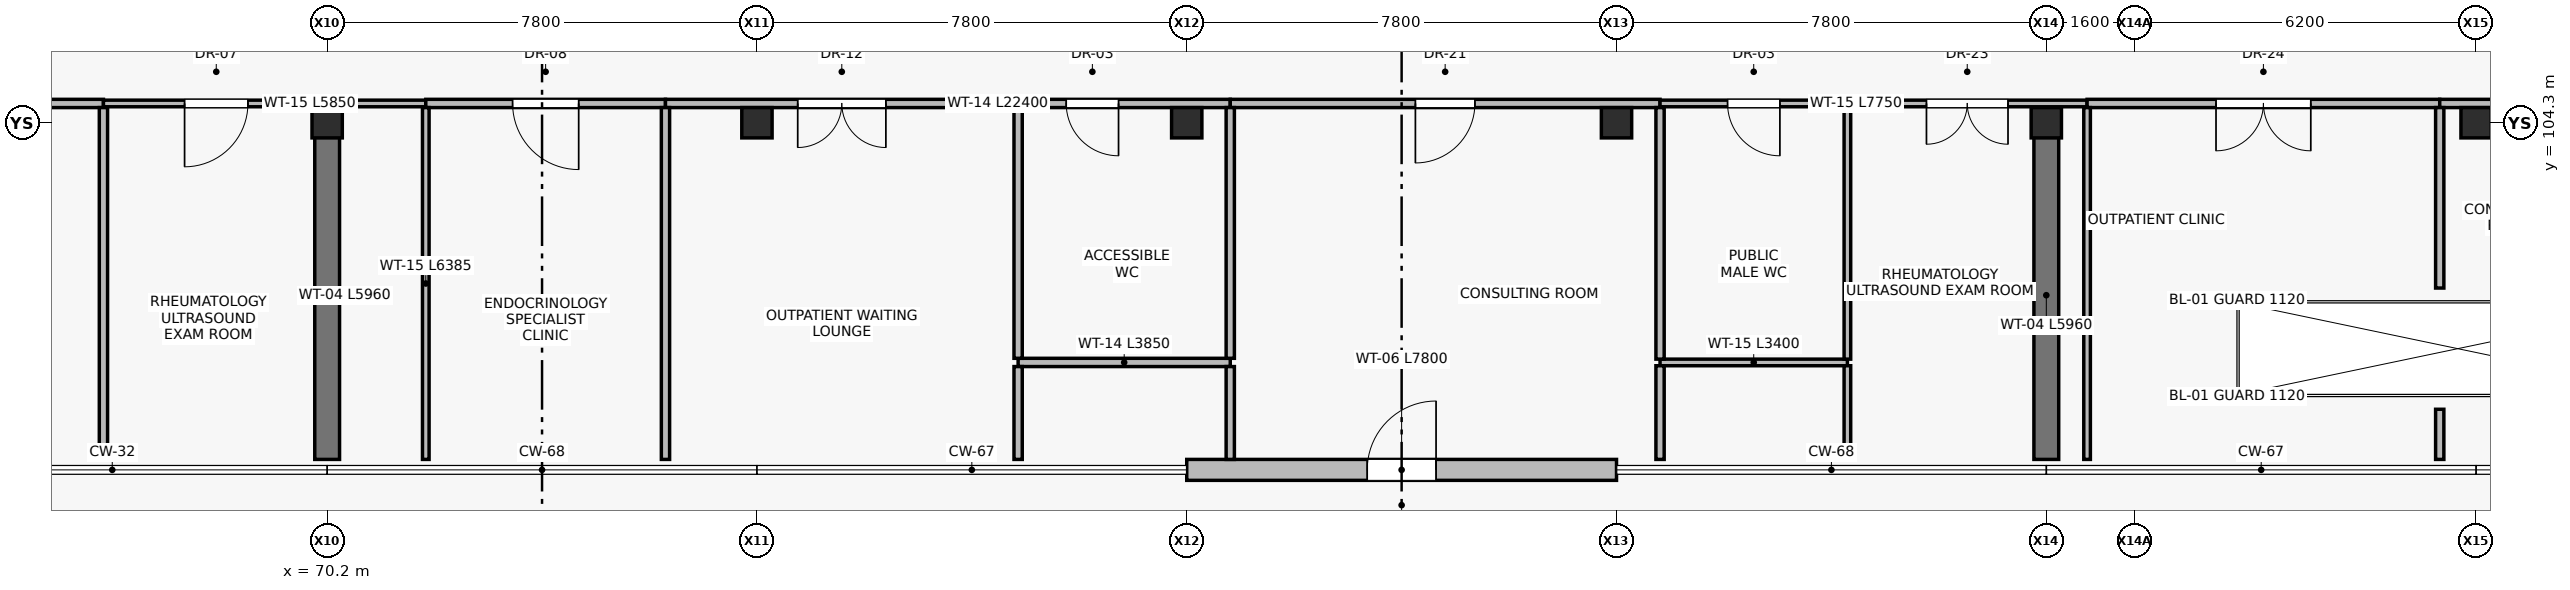
"""IFC4 building model, lengths in metres.
Left out: names, types, materials, properties, quantities, classifications, styles, units other than length and angle.
Written with IfcOpenShell. Run it as: python <this file> out.ifc"""

import sys

from ifc_helpers import new_model, si_unit, direction, frame, frame_2d, origin, origin_2d, place, context, subcontext, project, spatial, rectangle, extrude, element, fill, save


model = new_model("IFC4")
c1 = context("Model", 3, precision=1e-05, world=origin(), true_north=direction((0.0, 1.0)))
c2 = subcontext(c1, "Body", "Model", "MODEL_VIEW")
j1 = project(units=[si_unit("LENGTHUNIT", "METRE"), si_unit("PLANEANGLEUNIT", "RADIAN")], contexts=[c1])
p1 = place(None, origin())
s1 = spatial("IfcSite", under=j1, at=p1, CompositionType="ELEMENT")
p2 = place(p1, origin())
s2 = spatial("IfcBuilding", under=s1, at=p2, CompositionType="ELEMENT")
p3 = place(p2, frame((0.0, 0.0, 9.6)))
s3 = spatial("IfcBuildingStorey", under=s2, at=p3, CompositionType="ELEMENT", Elevation=9.6)
for number, where, z_axis, x_axis in (
    (1, (70.2, 104.3, 0.0), (0.0, 0.0, 1.0), (1.0, 0.0, 0.0)),
    (2, (78.0, 104.3, 0.0), (0.0, 0.0, 1.0), (1.0, 0.0, 0.0)),
    (3, (85.8, 104.3, 0.0), (0.0, 0.0, 1.0), (1.0, 0.0, 0.0)),
    (4, (93.6, 104.3, 0.0), (0.0, 0.0, 1.0), (1.0, 0.0, 0.0)),
    (5, (101.4, 104.3, 0.0), (0.0, 0.0, 1.0), (1.0, 0.0, 0.0)),
    (6, (109.2, 104.3, 0.0), (0.0, 0.0, 1.0), (1.0, 0.0, 0.0)),
):
    element("IfcColumn", number, at=place(p3, frame(where, z_axis=z_axis, x_axis=x_axis)), inside=s3, PredefinedType="COLUMN", context=c2, shape_type="SweptSolid", body=[
        extrude(rectangle(XDim=0.55, YDim=0.55, at=origin_2d()), origin(), (0.0, 0.0, 1.0), 4.5),
    ])
p4 = place(p3, frame((93.6, 98.0, 0.0), z_axis=(0.0, 0.0, 1.0), x_axis=(-1.0, 0.0, 0.0)))
e7 = element("IfcWall", 7, at=p4, inside=s3, PredefinedType="STANDARD", context=c2, shape_type="SweptSolid", body=[
    extrude(rectangle(XDim=7.8, YDim=0.38, at=frame_2d((3.9, 0.0))), origin(), (0.0, 0.0, 1.0), 4.24),
])
p5 = place(p4, frame((3.275, 0.0, 0.0)))
e8 = element("IfcOpeningElement", 8, at=p5, cuts=e7, PredefinedType="OPENING", context=c2, shape_type="SweptSolid", body=[
    extrude(rectangle(XDim=1.25, YDim=2.2, at=frame_2d((0.625, 1.1))), frame((0.0, 0.2, 0.0), z_axis=(0.0, -1.0, 0.0), x_axis=(1.0, 0.0, 0.0)), (0.0, 0.0, 1.0), 0.4),
])
for number, where, z_axis, x_axis in (
    (9, (70.2, 98.19, 0.0), (0.0, 0.0, 1.0), (0.0, 1.0, 0.0)),
    (10, (101.4, 98.19, 0.0), (0.0, 0.0, 1.0), (0.0, 1.0, 0.0)),
):
    element("IfcWall", number, at=place(p3, frame(where, z_axis=z_axis, x_axis=x_axis)), inside=s3, PredefinedType="SHEAR", context=c2, shape_type="SweptSolid", body=[
        extrude(rectangle(XDim=5.96, YDim=0.45, at=frame_2d((2.98, 0.0))), origin(), (0.0, 0.0, 1.0), 4.24),
    ])
p6 = place(p3, frame((66.14, 104.65, 0.0), z_axis=(0.0, 0.0, 1.0), x_axis=(-1.0, 0.0, 0.0)))
e11 = element("IfcWall", 11, at=p6, inside=s3, PredefinedType="PARTITIONING", context=c2, shape_type="SweptSolid", body=[
    extrude(rectangle(XDim=7.8, YDim=0.15, at=frame_2d((3.9, 0.0))), origin(), (0.0, 0.0, 1.0), 3.74),
])
p7 = place(p6, frame((4.52, 0.0, 0.0)))
e12 = element("IfcOpeningElement", 12, at=p7, cuts=e11, PredefinedType="OPENING", context=c2, shape_type="SweptSolid", body=[
    extrude(rectangle(XDim=1.1, YDim=2.15, at=frame_2d((0.55, 1.075))), frame((0.0, 0.085, 0.0), z_axis=(0.0, -1.0, 0.0), x_axis=(1.0, 0.0, 0.0)), (0.0, 0.0, 1.0), 0.17),
])
p8 = place(p3, frame((71.99, 104.65, 0.0), z_axis=(0.0, 0.0, 1.0), x_axis=(-1.0, 0.0, 0.0)))
e13 = element("IfcWall", 13, at=p8, inside=s3, PredefinedType="PARTITIONING", context=c2, shape_type="SweptSolid", body=[
    extrude(rectangle(XDim=5.85, YDim=0.12, at=frame_2d((2.925, 0.0))), origin(), (0.0, 0.0, 1.0), 3.74),
])
p9 = place(p8, frame((3.228, 0.0, 0.0)))
e14 = element("IfcOpeningElement", 14, at=p9, cuts=e13, PredefinedType="OPENING", context=c2, shape_type="SweptSolid", body=[
    extrude(rectangle(XDim=1.15, YDim=2.2, at=frame_2d((0.575, 1.1))), frame((0.0, 0.07, 0.0), z_axis=(0.0, -1.0, 0.0), x_axis=(1.0, 0.0, 0.0)), (0.0, 0.0, 1.0), 0.14),
])
p10 = place(p3, frame((76.34, 104.65, 0.0), z_axis=(0.0, 0.0, 1.0), x_axis=(-1.0, 0.0, 0.0)))
e15 = element("IfcWall", 15, at=p10, inside=s3, PredefinedType="PARTITIONING", context=c2, shape_type="SweptSolid", body=[
    extrude(rectangle(XDim=4.35, YDim=0.15, at=frame_2d((2.175, 0.0))), origin(), (0.0, 0.0, 1.0), 3.74),
])
p11 = place(p10, frame((1.575, 0.0, 0.0)))
e16 = element("IfcOpeningElement", 16, at=p11, cuts=e15, PredefinedType="OPENING", context=c2, shape_type="SweptSolid", body=[
    extrude(rectangle(XDim=1.2, YDim=2.2, at=frame_2d((0.6, 1.1))), frame((0.0, 0.085, 0.0), z_axis=(0.0, -1.0, 0.0), x_axis=(1.0, 0.0, 0.0)), (0.0, 0.0, 1.0), 0.17),
])
p12 = place(p3, frame((82.74, 104.65, 0.0), z_axis=(0.0, 0.0, 1.0), x_axis=(-1.0, 0.0, 0.0)))
e17 = element("IfcWall", 17, at=p12, inside=s3, PredefinedType="PARTITIONING", context=c2, shape_type="SweptSolid", body=[
    extrude(rectangle(XDim=6.4, YDim=0.15, at=frame_2d((3.2, 0.0))), origin(), (0.0, 0.0, 1.0), 3.74),
])
p13 = place(p12, frame((2.4, 0.0, 0.0)))
e18 = element("IfcOpeningElement", 18, at=p13, cuts=e17, PredefinedType="OPENING", context=c2, shape_type="SweptSolid", body=[
    extrude(rectangle(XDim=1.6, YDim=2.2, at=frame_2d((0.8, 1.1))), frame((0.0, 0.085, 0.0), z_axis=(0.0, -1.0, 0.0), x_axis=(1.0, 0.0, 0.0)), (0.0, 0.0, 1.0), 0.17),
])
p14 = place(p3, frame((86.59, 104.65, 0.0), z_axis=(0.0, 0.0, 1.0), x_axis=(-1.0, 0.0, 0.0)))
e19 = element("IfcWall", 19, at=p14, inside=s3, PredefinedType="PARTITIONING", context=c2, shape_type="SweptSolid", body=[
    extrude(rectangle(XDim=3.85, YDim=0.15, at=frame_2d((1.925, 0.0))), origin(), (0.0, 0.0, 1.0), 3.74),
])
p15 = place(p14, frame((2.028, 0.0, 0.0)))
e20 = element("IfcOpeningElement", 20, at=p15, cuts=e19, PredefinedType="OPENING", context=c2, shape_type="SweptSolid", body=[
    extrude(rectangle(XDim=0.95, YDim=2.1, at=frame_2d((0.475, 1.05))), frame((0.0, 0.085, 0.0), z_axis=(0.0, -1.0, 0.0), x_axis=(1.0, 0.0, 0.0)), (0.0, 0.0, 1.0), 0.17),
])
p16 = place(p3, frame((82.74, 99.95, 0.0), z_axis=(0.0, 0.0, 1.0), x_axis=(1.0, 0.0, 0.0)))
e21 = element("IfcWall", 21, at=p16, inside=s3, PredefinedType="PARTITIONING", context=c2, shape_type="SweptSolid", body=[
    extrude(rectangle(XDim=3.85, YDim=0.15, at=frame_2d((1.925, 0.0))), origin(), (0.0, 0.0, 1.0), 4.24),
])
p17 = place(p3, frame((94.39, 104.65, 0.0), z_axis=(0.0, 0.0, 1.0), x_axis=(-1.0, 0.0, 0.0)))
e22 = element("IfcWall", 22, at=p17, inside=s3, PredefinedType="PARTITIONING", context=c2, shape_type="SweptSolid", body=[
    extrude(rectangle(XDim=7.8, YDim=0.15, at=frame_2d((3.9, 0.0))), origin(), (0.0, 0.0, 1.0), 3.74),
])
p18 = place(p17, frame((3.36, 0.0, 0.0)))
e23 = element("IfcOpeningElement", 23, at=p18, cuts=e22, PredefinedType="OPENING", context=c2, shape_type="SweptSolid", body=[
    extrude(rectangle(XDim=1.08, YDim=2.2, at=frame_2d((0.54, 1.1))), frame((0.0, 0.085, 0.0), z_axis=(0.0, -1.0, 0.0), x_axis=(1.0, 0.0, 0.0)), (0.0, 0.0, 1.0), 0.17),
])
p19 = place(p3, frame((97.79, 104.65, 0.0), z_axis=(0.0, 0.0, 1.0), x_axis=(-1.0, 0.0, 0.0)))
e24 = element("IfcWall", 24, at=p19, inside=s3, PredefinedType="PARTITIONING", context=c2, shape_type="SweptSolid", body=[
    extrude(rectangle(XDim=3.4, YDim=0.12, at=frame_2d((1.7, 0.0))), origin(), (0.0, 0.0, 1.0), 3.74),
])
p20 = place(p19, frame((1.225, 0.0, 0.0)))
e25 = element("IfcOpeningElement", 25, at=p20, cuts=e24, PredefinedType="OPENING", context=c2, shape_type="SweptSolid", body=[
    extrude(rectangle(XDim=0.95, YDim=2.1, at=frame_2d((0.475, 1.05))), frame((0.0, 0.07, 0.0), z_axis=(0.0, -1.0, 0.0), x_axis=(1.0, 0.0, 0.0)), (0.0, 0.0, 1.0), 0.14),
])
p21 = place(p3, frame((94.39, 99.95, 0.0), z_axis=(0.0, 0.0, 1.0), x_axis=(1.0, 0.0, 0.0)))
e26 = element("IfcWall", 26, at=p21, inside=s3, PredefinedType="PARTITIONING", context=c2, shape_type="SweptSolid", body=[
    extrude(rectangle(XDim=3.4, YDim=0.12, at=frame_2d((1.7, 0.0))), origin(), (0.0, 0.0, 1.0), 4.24),
])
p22 = place(p3, frame((102.14, 104.65, 0.0), z_axis=(0.0, 0.0, 1.0), x_axis=(-1.0, 0.0, 0.0)))
e27 = element("IfcWall", 27, at=p22, inside=s3, PredefinedType="PARTITIONING", context=c2, shape_type="SweptSolid", body=[
    extrude(rectangle(XDim=4.35, YDim=0.12, at=frame_2d((2.175, 0.0))), origin(), (0.0, 0.0, 1.0), 3.74),
])
p23 = place(p22, frame((1.435, 0.0, 0.0)))
e28 = element("IfcOpeningElement", 28, at=p23, cuts=e27, PredefinedType="OPENING", context=c2, shape_type="SweptSolid", body=[
    extrude(rectangle(XDim=1.48, YDim=2.25, at=frame_2d((0.74, 1.125))), frame((0.0, 0.07, 0.0), z_axis=(0.0, -1.0, 0.0), x_axis=(1.0, 0.0, 0.0)), (0.0, 0.0, 1.0), 0.14),
])
p24 = place(p3, frame((108.54, 104.65, 0.0), z_axis=(0.0, 0.0, 1.0), x_axis=(-1.0, 0.0, 0.0)))
e29 = element("IfcWall", 29, at=p24, inside=s3, PredefinedType="PARTITIONING", context=c2, shape_type="SweptSolid", body=[
    extrude(rectangle(XDim=6.4, YDim=0.15, at=frame_2d((3.2, 0.0))), origin(), (0.0, 0.0, 1.0), 3.74),
])
p25 = place(p24, frame((2.34, 0.0, 0.0)))
e30 = element("IfcOpeningElement", 30, at=p25, cuts=e29, PredefinedType="OPENING", context=c2, shape_type="SweptSolid", body=[
    extrude(rectangle(XDim=1.72, YDim=2.3, at=frame_2d((0.86, 1.15))), frame((0.0, 0.085, 0.0), z_axis=(0.0, -1.0, 0.0), x_axis=(1.0, 0.0, 0.0)), (0.0, 0.0, 1.0), 0.17),
])
p26 = place(p3, frame((113.49, 104.65, 0.0), z_axis=(0.0, 0.0, 1.0), x_axis=(-1.0, 0.0, 0.0)))
e31 = element("IfcWall", 31, at=p26, inside=s3, PredefinedType="PARTITIONING", context=c2, shape_type="SweptSolid", body=[
    extrude(rectangle(XDim=4.95, YDim=0.15, at=frame_2d((2.475, 0.0))), origin(), (0.0, 0.0, 1.0), 3.74),
])
p27 = place(p26, frame((2.025, 0.0, 0.0)))
e32 = element("IfcOpeningElement", 32, at=p27, cuts=e31, PredefinedType="OPENING", context=c2, shape_type="SweptSolid", body=[
    extrude(rectangle(XDim=0.9, YDim=2.1, at=frame_2d((0.45, 1.05))), frame((0.0, 0.085, 0.0), z_axis=(0.0, -1.0, 0.0), x_axis=(1.0, 0.0, 0.0)), (0.0, 0.0, 1.0), 0.17),
])
p28 = place(p3, frame((66.14, 98.19, 0.0), z_axis=(0.0, 0.0, 1.0), x_axis=(0.0, 1.0, 0.0)))
e33 = element("IfcWall", 33, at=p28, inside=s3, PredefinedType="PARTITIONING", context=c2, shape_type="SweptSolid", body=[
    extrude(rectangle(XDim=6.385, YDim=0.15, at=frame_2d((3.192, 0.0))), origin(), (0.0, 0.0, 1.0), 4.24),
])
p29 = place(p3, frame((71.99, 98.19, 0.0), z_axis=(0.0, 0.0, 1.0), x_axis=(0.0, 1.0, 0.0)))
e34 = element("IfcWall", 34, at=p29, inside=s3, PredefinedType="PARTITIONING", context=c2, shape_type="SweptSolid", body=[
    extrude(rectangle(XDim=6.385, YDim=0.12, at=frame_2d((3.192, 0.0))), origin(), (0.0, 0.0, 1.0), 4.24),
])
p30 = place(p3, frame((76.34, 98.19, 0.0), z_axis=(0.0, 0.0, 1.0), x_axis=(0.0, 1.0, 0.0)))
e35 = element("IfcWall", 35, at=p30, inside=s3, PredefinedType="PARTITIONING", context=c2, shape_type="SweptSolid", body=[
    extrude(rectangle(XDim=6.385, YDim=0.15, at=frame_2d((3.192, 0.0))), origin(), (0.0, 0.0, 1.0), 4.24),
])
p31 = place(p3, frame((82.74, 98.19, 0.0), z_axis=(0.0, 0.0, 1.0), x_axis=(0.0, 1.0, 0.0)))
e36 = element("IfcWall", 36, at=p31, inside=s3, PredefinedType="PARTITIONING", context=c2, shape_type="SweptSolid", body=[
    extrude(rectangle(XDim=1.685, YDim=0.15, at=frame_2d((0.843, 0.0))), origin(), (0.0, 0.0, 1.0), 4.24),
])
for number, where, z_axis, x_axis in (
    (37, (82.74, 100.025, 0.0), (0.0, 0.0, 1.0), (0.0, 1.0, 0.0)),
    (38, (86.59, 100.025, 0.0), (0.0, 0.0, 1.0), (0.0, 1.0, 0.0)),
):
    element("IfcWall", number, at=place(p3, frame(where, z_axis=z_axis, x_axis=x_axis)), inside=s3, PredefinedType="PARTITIONING", context=c2, shape_type="SweptSolid", body=[
        extrude(rectangle(XDim=4.55, YDim=0.15, at=frame_2d((2.275, 0.0))), origin(), (0.0, 0.0, 1.0), 4.24),
    ])
p32 = place(p3, frame((86.59, 98.19, 0.0), z_axis=(0.0, 0.0, 1.0), x_axis=(0.0, 1.0, 0.0)))
e39 = element("IfcWall", 39, at=p32, inside=s3, PredefinedType="PARTITIONING", context=c2, shape_type="SweptSolid", body=[
    extrude(rectangle(XDim=1.685, YDim=0.15, at=frame_2d((0.843, 0.0))), origin(), (0.0, 0.0, 1.0), 4.24),
])
p33 = place(p3, frame((94.39, 98.19, 0.0), z_axis=(0.0, 0.0, 1.0), x_axis=(0.0, 1.0, 0.0)))
e40 = element("IfcWall", 40, at=p33, inside=s3, PredefinedType="PARTITIONING", context=c2, shape_type="SweptSolid", body=[
    extrude(rectangle(XDim=1.7, YDim=0.15, at=frame_2d((0.85, 0.0))), origin(), (0.0, 0.0, 1.0), 4.24),
])
p34 = place(p3, frame((94.39, 100.01, 0.0), z_axis=(0.0, 0.0, 1.0), x_axis=(0.0, 1.0, 0.0)))
e41 = element("IfcWall", 41, at=p34, inside=s3, PredefinedType="PARTITIONING", context=c2, shape_type="SweptSolid", body=[
    extrude(rectangle(XDim=4.565, YDim=0.15, at=frame_2d((2.282, 0.0))), origin(), (0.0, 0.0, 1.0), 4.24),
])
p35 = place(p3, frame((97.79, 100.01, 0.0), z_axis=(0.0, 0.0, 1.0), x_axis=(0.0, 1.0, 0.0)))
e42 = element("IfcWall", 42, at=p35, inside=s3, PredefinedType="PARTITIONING", context=c2, shape_type="SweptSolid", body=[
    extrude(rectangle(XDim=4.58, YDim=0.12, at=frame_2d((2.29, 0.0))), origin(), (0.0, 0.0, 1.0), 4.24),
])
p36 = place(p3, frame((97.79, 98.19, 0.0), z_axis=(0.0, 0.0, 1.0), x_axis=(0.0, 1.0, 0.0)))
e43 = element("IfcWall", 43, at=p36, inside=s3, PredefinedType="PARTITIONING", context=c2, shape_type="SweptSolid", body=[
    extrude(rectangle(XDim=1.7, YDim=0.12, at=frame_2d((0.85, 0.0))), origin(), (0.0, 0.0, 1.0), 4.24),
])
p37 = place(p3, frame((102.14, 98.19, 0.0), z_axis=(0.0, 0.0, 1.0), x_axis=(0.0, 1.0, 0.0)))
e44 = element("IfcWall", 44, at=p37, inside=s3, PredefinedType="PARTITIONING", context=c2, shape_type="SweptSolid", body=[
    extrude(rectangle(XDim=6.385, YDim=0.12, at=frame_2d((3.192, 0.0))), origin(), (0.0, 0.0, 1.0), 4.24),
])
p38 = place(p3, frame((108.54, 98.19, 0.0), z_axis=(0.0, 0.0, 1.0), x_axis=(0.0, 1.0, 0.0)))
e45 = element("IfcWall", 45, at=p38, inside=s3, PredefinedType="PARTITIONING", context=c2, shape_type="SweptSolid", body=[
    extrude(rectangle(XDim=0.91, YDim=0.15, at=frame_2d((0.455, 0.0))), origin(), (0.0, 0.0, 1.0), 4.24),
])
p39 = place(p3, frame((108.54, 101.3, 0.0), z_axis=(0.0, 0.0, 1.0), x_axis=(0.0, 1.0, 0.0)))
e46 = element("IfcWall", 46, at=p39, inside=s3, PredefinedType="PARTITIONING", context=c2, shape_type="SweptSolid", body=[
    extrude(rectangle(XDim=3.275, YDim=0.15, at=frame_2d((1.637, 0.0))), origin(), (0.0, 0.0, 1.0), 4.24),
])
p40 = place(p5, frame((1.25, 0.0, 0.0), z_axis=(0.0, 0.0, 1.0), x_axis=(-1.0, 0.0, 0.0)))
e47 = element("IfcDoor", 47, at=p40, inside=s3, OperationType="SINGLE_SWING_LEFT", PredefinedType="DOOR", context=c2, shape_type="SweptSolid", body=[
    extrude(rectangle(XDim=1.25, YDim=2.2, at=frame_2d((0.625, 1.1))), frame((0.0, 0.025, 0.0), z_axis=(0.0, -1.0, 0.0), x_axis=(1.0, 0.0, 0.0)), (0.0, 0.0, 1.0), 0.05),
])
fill(e8, e47)
p41 = place(p9, origin())
e48 = element("IfcDoor", 48, at=p41, inside=s3, OperationType="SINGLE_SWING_RIGHT", PredefinedType="DOOR", context=c2, shape_type="SweptSolid", body=[
    extrude(rectangle(XDim=1.15, YDim=2.2, at=frame_2d((0.575, 1.1))), frame((0.0, 0.025, 0.0), z_axis=(0.0, -1.0, 0.0), x_axis=(1.0, 0.0, 0.0)), (0.0, 0.0, 1.0), 0.05),
])
fill(e14, e48)
p42 = place(p11, origin())
e49 = element("IfcDoor", 49, at=p42, inside=s3, OperationType="SINGLE_SWING_LEFT", PredefinedType="DOOR", context=c2, shape_type="SweptSolid", body=[
    extrude(rectangle(XDim=1.2, YDim=2.2, at=frame_2d((0.6, 1.1))), frame((0.0, 0.025, 0.0), z_axis=(0.0, -1.0, 0.0), x_axis=(1.0, 0.0, 0.0)), (0.0, 0.0, 1.0), 0.05),
])
fill(e16, e49)
p43 = place(p13, origin())
e50 = element("IfcDoor", 50, at=p43, inside=s3, OperationType="DOUBLE_DOOR_SINGLE_SWING", PredefinedType="DOOR", context=c2, shape_type="SweptSolid", body=[
    extrude(rectangle(XDim=1.6, YDim=2.2, at=frame_2d((0.8, 1.1))), frame((0.0, 0.025, 0.0), z_axis=(0.0, -1.0, 0.0), x_axis=(1.0, 0.0, 0.0)), (0.0, 0.0, 1.0), 0.05),
])
fill(e18, e50)
p44 = place(p15, origin())
e51 = element("IfcDoor", 51, at=p44, inside=s3, OperationType="SINGLE_SWING_LEFT", PredefinedType="DOOR", context=c2, shape_type="SweptSolid", body=[
    extrude(rectangle(XDim=0.95, YDim=2.1, at=frame_2d((0.475, 1.05))), frame((0.0, 0.025, 0.0), z_axis=(0.0, -1.0, 0.0), x_axis=(1.0, 0.0, 0.0)), (0.0, 0.0, 1.0), 0.05),
])
fill(e20, e51)
p45 = place(p18, origin())
e52 = element("IfcDoor", 52, at=p45, inside=s3, OperationType="SINGLE_SWING_RIGHT", PredefinedType="DOOR", context=c2, shape_type="SweptSolid", body=[
    extrude(rectangle(XDim=1.08, YDim=2.2, at=frame_2d((0.54, 1.1))), frame((0.0, 0.025, 0.0), z_axis=(0.0, -1.0, 0.0), x_axis=(1.0, 0.0, 0.0)), (0.0, 0.0, 1.0), 0.05),
])
fill(e23, e52)
p46 = place(p20, origin())
e53 = element("IfcDoor", 53, at=p46, inside=s3, OperationType="SINGLE_SWING_LEFT", PredefinedType="DOOR", context=c2, shape_type="SweptSolid", body=[
    extrude(rectangle(XDim=0.95, YDim=2.1, at=frame_2d((0.475, 1.05))), frame((0.0, 0.025, 0.0), z_axis=(0.0, -1.0, 0.0), x_axis=(1.0, 0.0, 0.0)), (0.0, 0.0, 1.0), 0.05),
])
fill(e25, e53)
p47 = place(p23, origin())
e54 = element("IfcDoor", 54, at=p47, inside=s3, OperationType="DOUBLE_DOOR_SINGLE_SWING", PredefinedType="DOOR", context=c2, shape_type="SweptSolid", body=[
    extrude(rectangle(XDim=1.48, YDim=2.25, at=frame_2d((0.74, 1.125))), frame((0.0, 0.025, 0.0), z_axis=(0.0, -1.0, 0.0), x_axis=(1.0, 0.0, 0.0)), (0.0, 0.0, 1.0), 0.05),
])
fill(e28, e54)
p48 = place(p25, origin())
e55 = element("IfcDoor", 55, at=p48, inside=s3, OperationType="DOUBLE_DOOR_SINGLE_SWING", PredefinedType="DOOR", context=c2, shape_type="SweptSolid", body=[
    extrude(rectangle(XDim=1.72, YDim=2.3, at=frame_2d((0.86, 1.15))), frame((0.0, 0.025, 0.0), z_axis=(0.0, -1.0, 0.0), x_axis=(1.0, 0.0, 0.0)), (0.0, 0.0, 1.0), 0.05),
])
fill(e30, e55)
save(model, sys.argv[1])
